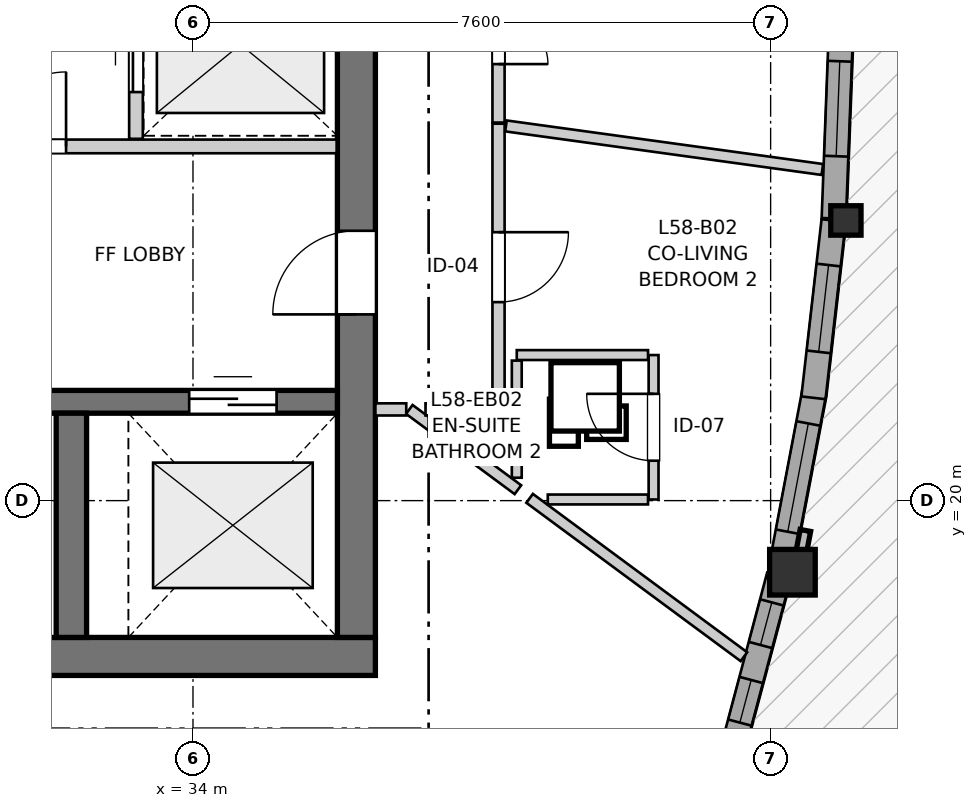
"""IFC4 building model, lengths in metres.
Left out: names, types, materials, properties, quantities, classifications, styles, units other than length and angle.
Written with IfcOpenShell. Run it as: python <this file> out.ifc"""

import sys

from ifc_helpers import new_model, si_unit, direction, frame, frame_2d, origin, origin_2d, place, context, subcontext, project, spatial, rectangle, i_section, extrude, source, transform, mapped, element, fill, save


model = new_model("IFC4")
c1 = context("Model", 3, precision=1e-05, world=origin(), true_north=direction((0.0, 1.0)))
c2 = subcontext(c1, "Body", "Model", "MODEL_VIEW")
j1 = project(units=[si_unit("LENGTHUNIT", "METRE"), si_unit("PLANEANGLEUNIT", "RADIAN")], contexts=[c1])
p1 = place(None, origin())
s1 = spatial("IfcSite", under=j1, at=p1, CompositionType="ELEMENT")
p2 = place(p1, origin())
s2 = spatial("IfcBuilding", under=s1, at=p2, CompositionType="ELEMENT")
p3 = place(p2, frame((0.0, 0.0, 195.6)))
s3 = spatial("IfcBuildingStorey", under=s2, at=p3, CompositionType="ELEMENT", Elevation=195.6)
p4 = place(p3, frame((24.3, 17.95, 0.0), z_axis=(0.0, 0.0, 1.0), x_axis=(1.0, 0.0, 0.0)))
e1 = element("IfcWall", 1, at=p4, inside=s3, PredefinedType="SHEAR", context=c2, shape_type="SweptSolid", body=[
    extrude(rectangle(XDim=12.1, YDim=0.5, at=frame_2d((6.05, 0.0))), origin(), (0.0, 0.0, 1.0), 2.96),
])
p5 = place(p3, frame((36.15, 18.2, 0.0), z_axis=(0.0, 0.0, 1.0), x_axis=(0.0, 1.0, 0.0)))
e2 = element("IfcWall", 2, at=p5, inside=s3, PredefinedType="SHEAR", context=c2, shape_type="SweptSolid", body=[
    extrude(rectangle(XDim=15.6, YDim=0.5, at=frame_2d((7.8, 0.0))), origin(), (0.0, 0.0, 1.0), 2.96),
])
p6 = place(p5, frame((4.25, 0.0, 0.0)))
e3 = element("IfcOpeningElement", 3, at=p6, cuts=e2, PredefinedType="OPENING", context=c2, shape_type="SweptSolid", body=[
    extrude(rectangle(XDim=1.1, YDim=2.15, at=frame_2d((0.55, 1.075))), frame((0.0, 0.26, 0.0), z_axis=(0.0, -1.0, 0.0), x_axis=(1.0, 0.0, 0.0)), (0.0, 0.0, 1.0), 0.52),
])
p7 = place(p5, frame((10.25, 0.0, 0.0)))
e4 = element("IfcOpeningElement", 4, at=p7, cuts=e2, PredefinedType="OPENING", context=c2, shape_type="SweptSolid", body=[
    extrude(rectangle(XDim=1.1, YDim=2.15, at=frame_2d((0.55, 1.075))), frame((0.0, 0.26, 0.0), z_axis=(0.0, -1.0, 0.0), x_axis=(1.0, 0.0, 0.0)), (0.0, 0.0, 1.0), 0.52),
])
p8 = place(p3, frame((24.8, 21.3, 0.0), z_axis=(0.0, 0.0, 1.0), x_axis=(1.0, 0.0, 0.0)))
e5 = element("IfcWall", 5, at=p8, inside=s3, PredefinedType="SHEAR", context=c2, shape_type="SweptSolid", body=[
    extrude(rectangle(XDim=11.1, YDim=0.3, at=frame_2d((5.55, 0.0))), origin(), (0.0, 0.0, 1.0), 2.96),
])
p9 = place(p8, frame((6.22, 0.0, 0.0)))
e6 = element("IfcOpeningElement", 6, at=p9, cuts=e5, PredefinedType="OPENING", context=c2, shape_type="SweptSolid", body=[
    extrude(rectangle(XDim=0.98, YDim=2.15, at=frame_2d((0.49, 1.075))), frame((0.0, 0.16, 0.0), z_axis=(0.0, -1.0, 0.0), x_axis=(1.0, 0.0, 0.0)), (0.0, 0.0, 1.0), 0.32),
])
p10 = place(p8, frame((9.15, 0.0, 0.0)))
e7 = element("IfcOpeningElement", 7, at=p10, cuts=e5, PredefinedType="OPENING", context=c2, shape_type="SweptSolid", body=[
    extrude(rectangle(XDim=1.15, YDim=2.15, at=frame_2d((0.575, 1.075))), frame((0.0, 0.16, 0.0), z_axis=(0.0, -1.0, 0.0), x_axis=(1.0, 0.0, 0.0)), (0.0, 0.0, 1.0), 0.32),
])
p11 = place(p3, frame((32.4, 18.2, 0.0), z_axis=(0.0, 0.0, 1.0), x_axis=(0.0, 1.0, 0.0)))
e8 = element("IfcWall", 8, at=p11, inside=s3, PredefinedType="SHEAR", context=c2, shape_type="SweptSolid", body=[
    extrude(rectangle(XDim=2.95, YDim=0.4, at=frame_2d((1.475, 0.0))), origin(), (0.0, 0.0, 1.0), 2.96),
])
m1 = source(origin(), c2, "Body", "SweptSolid", [
    extrude(rectangle(XDim=0.6, YDim=0.6, at=origin_2d()), origin(), (0.0, 0.0, 1.0), 2.96),
])
p12 = place(p3, frame((41.887, 19.058, 0.0), z_axis=(0.0, 0.0, 1.0), x_axis=(1.0, 0.0, 0.0)))
e9 = element("IfcColumn", 9, at=p12, inside=s3, PredefinedType="COLUMN", context=c2, shape_type="MappedRepresentation", body=[
    mapped(m1, transform((0.0, 0.0, 0.0), x_axis=(1.0, 0.0, 0.0), y_axis=(0.0, 1.0, 0.0), z_axis=(0.0, 0.0, 1.0), scale=1.0)),
])
m2 = source(origin(), c2, "Body", "SweptSolid", [
    extrude(i_section(OverallWidth=0.398, OverallDepth=0.387, WebThickness=0.019, FlangeThickness=0.03, FilletRadius=0.015, at=origin_2d()), origin(), (0.0, 0.0, 1.0), 2.96),
])
p13 = place(p3, frame((42.59, 23.686, 0.0), z_axis=(0.0, 0.0, 1.0), x_axis=(1.0, 0.0, 0.0)))
e10 = element("IfcColumn", 10, at=p13, inside=s3, PredefinedType="PILASTER", context=c2, shape_type="MappedRepresentation", body=[
    mapped(m2, transform((0.0, 0.0, 0.0), x_axis=(1.0, 0.0, 0.0), y_axis=(0.0, 1.0, 0.0), z_axis=(0.0, 0.0, 1.0), scale=1.0)),
])
p14 = place(p3, frame((41.107, 16.748, 0.0), z_axis=(0.0, 0.0, 1.0), x_axis=(0.257000958827, 0.966411148095, 0.0)))
e11 = element("IfcWall", 11, at=p14, inside=s3, PredefinedType="SOLIDWALL", context=c2, shape_type="SweptSolid", body=[
    extrude(rectangle(XDim=2.343, YDim=0.32, at=frame_2d((1.171, 0.0))), origin(), (0.0, 0.0, 1.0), 2.58),
])
p15 = place(p14, frame((0.343, 0.0, 0.82)))
e12 = element("IfcOpeningElement", 12, at=p15, cuts=e11, PredefinedType="OPENING", context=c2, shape_type="SweptSolid", body=[
    extrude(rectangle(XDim=0.58, YDim=1.35, at=frame_2d((0.29, 0.675))), frame((0.0, 0.17, 0.0), z_axis=(0.0, -1.0, 0.0), x_axis=(1.0, 0.0, 0.0)), (0.0, 0.0, 1.0), 0.34),
])
p16 = place(p14, frame((1.399, 0.0, 0.82)))
e13 = element("IfcOpeningElement", 13, at=p16, cuts=e11, PredefinedType="OPENING", context=c2, shape_type="SweptSolid", body=[
    extrude(rectangle(XDim=0.58, YDim=1.35, at=frame_2d((0.29, 0.675))), frame((0.0, 0.17, 0.0), z_axis=(0.0, -1.0, 0.0), x_axis=(1.0, 0.0, 0.0)), (0.0, 0.0, 1.0), 0.34),
])
p17 = place(p3, frame((41.747, 19.176, 0.0), z_axis=(0.0, 0.0, 1.0), x_axis=(0.186649393072, 0.982426589657, 0.0)))
e14 = element("IfcWall", 14, at=p17, inside=s3, PredefinedType="SOLIDWALL", context=c2, shape_type="SweptSolid", body=[
    extrude(rectangle(XDim=2.303, YDim=0.32, at=frame_2d((1.152, 0.0))), origin(), (0.0, 0.0, 1.0), 2.58),
])
p18 = place(p17, frame((0.422, 0.0, 0.82)))
e15 = element("IfcOpeningElement", 15, at=p18, cuts=e14, PredefinedType="OPENING", context=c2, shape_type="SweptSolid", body=[
    extrude(rectangle(XDim=1.45, YDim=1.25, at=frame_2d((0.725, 0.625))), frame((0.0, 0.17, 0.0), z_axis=(0.0, -1.0, 0.0), x_axis=(1.0, 0.0, 0.0)), (0.0, 0.0, 1.0), 0.34),
])
p19 = place(p3, frame((42.163, 21.352, 0.0), z_axis=(0.0, 0.0, 1.0), x_axis=(0.113273764078, 0.993563814947, 0.0)))
e16 = element("IfcWall", 16, at=p19, inside=s3, PredefinedType="SOLIDWALL", context=c2, shape_type="SweptSolid", body=[
    extrude(rectangle(XDim=2.347, YDim=0.32, at=frame_2d((1.174, 0.0))), origin(), (0.0, 0.0, 1.0), 2.58),
])
p20 = place(p19, frame((0.608, 0.0, 0.82)))
e17 = element("IfcOpeningElement", 17, at=p20, cuts=e16, PredefinedType="OPENING", context=c2, shape_type="SweptSolid", body=[
    extrude(rectangle(XDim=1.15, YDim=1.2, at=frame_2d((0.575, 0.6))), frame((0.0, 0.17, 0.0), z_axis=(0.0, -1.0, 0.0), x_axis=(1.0, 0.0, 0.0)), (0.0, 0.0, 1.0), 0.34),
])
p21 = place(p3, frame((42.431, 23.712, 0.0), z_axis=(0.0, 0.0, 1.0), x_axis=(0.037979071107, 0.999278534823, 0.0)))
e18 = element("IfcWall", 18, at=p21, inside=s3, PredefinedType="SOLIDWALL", context=c2, shape_type="SweptSolid", body=[
    extrude(rectangle(XDim=2.333, YDim=0.32, at=frame_2d((1.167, 0.0))), origin(), (0.0, 0.0, 1.0), 2.58),
])
p22 = place(p21, frame((0.82, 0.0, 0.82)))
e19 = element("IfcOpeningElement", 19, at=p22, cuts=e18, PredefinedType="OPENING", context=c2, shape_type="SweptSolid", body=[
    extrude(rectangle(XDim=1.25, YDim=1.35, at=frame_2d((0.625, 0.675))), frame((0.0, 0.17, 0.0), z_axis=(0.0, -1.0, 0.0), x_axis=(1.0, 0.0, 0.0)), (0.0, 0.0, 1.0), 0.34),
])
p23 = place(p3, frame((30.67, 24.66, 0.0), z_axis=(0.0, 0.0, 1.0), x_axis=(1.0, 0.0, 0.0)))
e20 = element("IfcWall", 20, at=p23, inside=s3, PredefinedType="PARTITIONING", context=c2, shape_type="SweptSolid", body=[
    extrude(rectangle(XDim=5.22, YDim=0.18, at=frame_2d((2.61, 0.0))), origin(), (0.0, 0.0, 1.0), 2.96),
])
p24 = place(p23, frame((0.68, 0.0, 0.0)))
e21 = element("IfcOpeningElement", 21, at=p24, cuts=e20, PredefinedType="OPENING", context=c2, shape_type="SweptSolid", body=[
    extrude(rectangle(XDim=0.98, YDim=2.15, at=frame_2d((0.49, 1.075))), frame((0.0, 0.1, 0.0), z_axis=(0.0, -1.0, 0.0), x_axis=(1.0, 0.0, 0.0)), (0.0, 0.0, 1.0), 0.2),
])
p25 = place(p3, frame((33.25, 24.76, 0.0), z_axis=(0.0, 0.0, 1.0), x_axis=(0.0, 1.0, 0.0)))
e22 = element("IfcWall", 22, at=p25, inside=s3, PredefinedType="PARTITIONING", context=c2, shape_type="SweptSolid", body=[
    extrude(rectangle(XDim=2.48, YDim=0.18, at=frame_2d((1.24, 0.0))), origin(), (0.0, 0.0, 1.0), 2.96),
])
p26 = place(p25, frame((0.615, 0.0, 0.0)))
e23 = element("IfcOpeningElement", 23, at=p26, cuts=e22, PredefinedType="OPENING", context=c2, shape_type="SweptSolid", body=[
    extrude(rectangle(XDim=1.25, YDim=2.15, at=frame_2d((0.625, 1.075))), frame((0.0, 0.1, 0.0), z_axis=(0.0, -1.0, 0.0), x_axis=(1.0, 0.0, 0.0)), (0.0, 0.0, 1.0), 0.2),
])
p27 = place(p3, frame((38.02, 24.959, 0.0), z_axis=(0.0, 0.0, 1.0), x_axis=(0.0, -1.0, 0.0)))
e24 = element("IfcWall", 24, at=p27, inside=s3, PredefinedType="PARTITIONING", context=c2, shape_type="SweptSolid", body=[
    extrude(rectangle(XDim=3.759, YDim=0.16, at=frame_2d((1.879, 0.0))), origin(), (0.0, 0.0, 1.0), 2.96),
])
p28 = place(p27, frame((1.427, 0.0, 0.0)))
e25 = element("IfcOpeningElement", 25, at=p28, cuts=e24, PredefinedType="OPENING", context=c2, shape_type="SweptSolid", body=[
    extrude(rectangle(XDim=0.92, YDim=2.1, at=frame_2d((0.46, 1.05))), frame((0.0, 0.09, 0.0), z_axis=(0.0, -1.0, 0.0), x_axis=(1.0, 0.0, 0.0)), (0.0, 0.0, 1.0), 0.18),
])
p29 = place(p3, frame((38.02, 27.813, 0.0), z_axis=(0.0, 0.0, 1.0), x_axis=(0.0, -1.0, 0.0)))
e26 = element("IfcWall", 26, at=p29, inside=s3, PredefinedType="PARTITIONING", context=c2, shape_type="SweptSolid", body=[
    extrude(rectangle(XDim=2.839, YDim=0.16, at=frame_2d((1.419, 0.0))), origin(), (0.0, 0.0, 1.0), 2.96),
])
p30 = place(p29, frame((0.77, 0.0, 0.0)))
e27 = element("IfcOpeningElement", 27, at=p30, cuts=e26, PredefinedType="OPENING", context=c2, shape_type="SweptSolid", body=[
    extrude(rectangle(XDim=1.3, YDim=2.1, at=frame_2d((0.65, 1.05))), frame((0.0, 0.09, 0.0), z_axis=(0.0, -1.0, 0.0), x_axis=(1.0, 0.0, 0.0)), (0.0, 0.0, 1.0), 0.18),
])
p31 = place(p3, frame((40.06, 20.015, 0.0), z_axis=(0.0, 0.0, 1.0), x_axis=(0.0, 1.0, 0.0)))
e28 = element("IfcWall", 28, at=p31, inside=s3, PredefinedType="PARTITIONING", context=c2, shape_type="SweptSolid", body=[
    extrude(rectangle(XDim=1.9, YDim=0.13, at=frame_2d((0.95, 0.0))), origin(), (0.0, 0.0, 1.0), 2.598),
])
p32 = place(p31, frame((0.51, 0.0, 0.0)))
e29 = element("IfcOpeningElement", 29, at=p32, cuts=e28, PredefinedType="OPENING", context=c2, shape_type="SweptSolid", body=[
    extrude(rectangle(XDim=0.88, YDim=2.05, at=frame_2d((0.44, 1.025))), frame((0.0, 0.075, 0.0), z_axis=(0.0, -1.0, 0.0), x_axis=(1.0, 0.0, 0.0)), (0.0, 0.0, 1.0), 0.15),
])
p33 = place(p3, frame((38.118, 24.929, 0.0), z_axis=(0.0, 0.0, 1.0), x_axis=(0.990658246077, -0.136368029533, 0.0)))
e30 = element("IfcWall", 30, at=p33, inside=s3, PredefinedType="PARTITIONING", context=c2, shape_type="SweptSolid", body=[
    extrude(rectangle(XDim=4.202, YDim=0.145, at=frame_2d((2.101, 0.0))), origin(), (0.0, 0.0, 1.0), 2.96),
])
p34 = place(p3, frame((38.429, 20.03, 0.0), z_axis=(0.0, 0.0, 1.0), x_axis=(0.804249944798, -0.594291196546, 0.0)))
e31 = element("IfcWall", 31, at=p34, inside=s3, PredefinedType="PARTITIONING", context=c2, shape_type="SweptSolid", body=[
    extrude(rectangle(XDim=3.506, YDim=0.145, at=frame_2d((1.753, 0.0))), origin(), (0.0, 0.0, 1.0), 2.96),
])
p35 = place(p3, frame((38.26, 21.915, 0.0), z_axis=(0.0, 0.0, 1.0), x_axis=(1.0, 0.0, 0.0)))
e32 = element("IfcWall", 32, at=p35, inside=s3, PredefinedType="PARTITIONING", context=c2, shape_type="SweptSolid", body=[
    extrude(rectangle(XDim=1.727, YDim=0.13, at=frame_2d((0.864, 0.0))), origin(), (0.0, 0.0, 1.0), 2.96),
])
p36 = place(p3, frame((36.846, 21.2, 0.0), z_axis=(0.0, 0.0, 1.0), x_axis=(0.804250382672, -0.594290603974, 0.0)))
e33 = element("IfcWall", 33, at=p36, inside=s3, PredefinedType="PARTITIONING", context=c2, shape_type="SweptSolid", body=[
    extrude(rectangle(XDim=1.777, YDim=0.145, at=frame_2d((0.888, 0.0))), origin(), (0.0, 0.0, 1.0), 2.96),
])
p37 = place(p3, frame((38.26, 20.301, 0.0), z_axis=(0.0, 0.0, 1.0), x_axis=(0.0, 1.0, 0.0)))
e34 = element("IfcWall", 34, at=p37, inside=s3, PredefinedType="PARTITIONING", context=c2, shape_type="SweptSolid", body=[
    extrude(rectangle(XDim=1.541, YDim=0.13, at=frame_2d((0.771, 0.0))), origin(), (0.0, 0.0, 1.0), 2.628),
])
p38 = place(p3, frame((38.668, 20.015, 0.0), z_axis=(0.0, 0.0, 1.0), x_axis=(1.0, 0.0, 0.0)))
e35 = element("IfcWall", 35, at=p38, inside=s3, PredefinedType="PARTITIONING", context=c2, shape_type="SweptSolid", body=[
    extrude(rectangle(XDim=1.319, YDim=0.13, at=frame_2d((0.66, 0.0))), origin(), (0.0, 0.0, 1.0), 2.96),
])
p39 = place(p3, frame((37.059, 21.2, 0.0), z_axis=(0.0, 0.0, 1.0), x_axis=(1.0, 0.0, 0.0)))
e36 = element("IfcWall", 36, at=p39, inside=s3, PredefinedType="PARTITIONING", context=c2, shape_type="SweptSolid", body=[
    extrude(rectangle(XDim=0.873, YDim=0.16, at=frame_2d((0.437, 0.0))), origin(), (0.0, 0.0, 1.0), 2.96),
])
p40 = place(p3, frame((36.4, 21.2, 0.0), z_axis=(0.0, 0.0, 1.0), x_axis=(1.0, 0.0, 0.0)))
e37 = element("IfcWall", 37, at=p40, inside=s3, PredefinedType="PARTITIONING", context=c2, shape_type="SweptSolid", body=[
    extrude(rectangle(XDim=0.406, YDim=0.16, at=frame_2d((0.203, 0.0))), origin(), (0.0, 0.0, 1.0), 2.96),
])
m3 = source(origin(), c2, "Body", "SweptSolid", [
    extrude(rectangle(XDim=0.58, YDim=1.35, at=frame_2d((0.29, 0.675))), frame((0.0, 0.03, 0.0), z_axis=(0.0, -1.0, 0.0), x_axis=(1.0, 0.0, 0.0)), (0.0, 0.0, 1.0), 0.06),
])
p41 = place(p15, origin())
e38 = element("IfcWindow", 38, at=p41, inside=s3, PartitioningType="SINGLE_PANEL", PredefinedType="WINDOW", context=c2, shape_type="MappedRepresentation", body=[
    mapped(m3, transform((0.0, 0.0, 0.0), x_axis=(1.0, 0.0, 0.0), y_axis=(0.0, 1.0, 0.0), z_axis=(0.0, 0.0, 1.0), scale=1.0)),
])
fill(e12, e38)
p42 = place(p16, origin())
e39 = element("IfcWindow", 39, at=p42, inside=s3, PartitioningType="SINGLE_PANEL", PredefinedType="WINDOW", context=c2, shape_type="MappedRepresentation", body=[
    mapped(m3, transform((0.0, 0.0, 0.0), x_axis=(1.0, 0.0, 0.0), y_axis=(0.0, 1.0, 0.0), z_axis=(0.0, 0.0, 1.0), scale=1.0)),
])
fill(e13, e39)
m4 = source(origin(), c2, "Body", "SweptSolid", [
    extrude(rectangle(XDim=1.45, YDim=1.25, at=frame_2d((0.725, 0.625))), frame((0.0, 0.03, 0.0), z_axis=(0.0, -1.0, 0.0), x_axis=(1.0, 0.0, 0.0)), (0.0, 0.0, 1.0), 0.06),
])
p43 = place(p18, origin())
e40 = element("IfcWindow", 40, at=p43, inside=s3, PartitioningType="SINGLE_PANEL", PredefinedType="WINDOW", context=c2, shape_type="MappedRepresentation", body=[
    mapped(m4, transform((0.0, 0.0, 0.0), x_axis=(1.0, 0.0, 0.0), y_axis=(0.0, 1.0, 0.0), z_axis=(0.0, 0.0, 1.0), scale=1.0)),
])
fill(e15, e40)
m5 = source(origin(), c2, "Body", "SweptSolid", [
    extrude(rectangle(XDim=1.15, YDim=1.2, at=frame_2d((0.575, 0.6))), frame((0.0, 0.03, 0.0), z_axis=(0.0, -1.0, 0.0), x_axis=(1.0, 0.0, 0.0)), (0.0, 0.0, 1.0), 0.06),
])
p44 = place(p20, origin())
e41 = element("IfcWindow", 41, at=p44, inside=s3, PartitioningType="SINGLE_PANEL", PredefinedType="WINDOW", context=c2, shape_type="MappedRepresentation", body=[
    mapped(m5, transform((0.0, 0.0, 0.0), x_axis=(1.0, 0.0, 0.0), y_axis=(0.0, 1.0, 0.0), z_axis=(0.0, 0.0, 1.0), scale=1.0)),
])
fill(e17, e41)
m6 = source(origin(), c2, "Body", "SweptSolid", [
    extrude(rectangle(XDim=1.25, YDim=1.35, at=frame_2d((0.625, 0.675))), frame((0.0, 0.03, 0.0), z_axis=(0.0, -1.0, 0.0), x_axis=(1.0, 0.0, 0.0)), (0.0, 0.0, 1.0), 0.06),
])
p45 = place(p22, origin())
e42 = element("IfcWindow", 42, at=p45, inside=s3, PartitioningType="SINGLE_PANEL", PredefinedType="WINDOW", context=c2, shape_type="MappedRepresentation", body=[
    mapped(m6, transform((0.0, 0.0, 0.0), x_axis=(1.0, 0.0, 0.0), y_axis=(0.0, 1.0, 0.0), z_axis=(0.0, 0.0, 1.0), scale=1.0)),
])
fill(e19, e42)
m7 = source(origin(), c2, "Body", "SweptSolid", [
    extrude(rectangle(XDim=1.15, YDim=2.15, at=frame_2d((0.575, 1.075))), frame((0.0, 0.025, 0.0), z_axis=(0.0, -1.0, 0.0), x_axis=(1.0, 0.0, 0.0)), (0.0, 0.0, 1.0), 0.05),
])
p46 = place(p10, origin())
e43 = element("IfcDoor", 43, at=p46, inside=s3, OperationType="DOUBLE_DOOR_SLIDING", PredefinedType="DOOR", context=c2, shape_type="MappedRepresentation", body=[
    mapped(m7, transform((0.0, 0.0, 0.0), x_axis=(1.0, 0.0, 0.0), y_axis=(0.0, 1.0, 0.0), z_axis=(0.0, 0.0, 1.0), scale=1.0)),
])
fill(e7, e43)
m8 = source(origin(), c2, "Body", "SweptSolid", [
    extrude(rectangle(XDim=1.1, YDim=2.15, at=frame_2d((0.55, 1.075))), frame((0.0, 0.025, 0.0), z_axis=(0.0, -1.0, 0.0), x_axis=(1.0, 0.0, 0.0)), (0.0, 0.0, 1.0), 0.05),
])
p47 = place(p6, origin())
e44 = element("IfcDoor", 44, at=p47, inside=s3, OperationType="SINGLE_SWING_LEFT", PredefinedType="DOOR", context=c2, shape_type="MappedRepresentation", body=[
    mapped(m8, transform((0.0, 0.0, 0.0), x_axis=(1.0, 0.0, 0.0), y_axis=(0.0, 1.0, 0.0), z_axis=(0.0, 0.0, 1.0), scale=1.0)),
])
fill(e3, e44)
m9 = source(origin(), c2, "Body", "SweptSolid", [
    extrude(rectangle(XDim=0.98, YDim=2.15, at=frame_2d((0.49, 1.075))), frame((0.0, 0.025, 0.0), z_axis=(0.0, -1.0, 0.0), x_axis=(1.0, 0.0, 0.0)), (0.0, 0.0, 1.0), 0.05),
])
p48 = place(p24, origin())
e45 = element("IfcDoor", 45, at=p48, inside=s3, OperationType="SINGLE_SWING_RIGHT", PredefinedType="DOOR", context=c2, shape_type="MappedRepresentation", body=[
    mapped(m9, transform((0.0, 0.0, 0.0), x_axis=(1.0, 0.0, 0.0), y_axis=(0.0, 1.0, 0.0), z_axis=(0.0, 0.0, 1.0), scale=1.0)),
])
fill(e21, e45)
m10 = source(origin(), c2, "Body", "SweptSolid", [
    extrude(rectangle(XDim=1.25, YDim=2.15, at=frame_2d((0.625, 1.075))), frame((0.0, 0.025, 0.0), z_axis=(0.0, -1.0, 0.0), x_axis=(1.0, 0.0, 0.0)), (0.0, 0.0, 1.0), 0.05),
])
p49 = place(p26, origin())
e46 = element("IfcDoor", 46, at=p49, inside=s3, OperationType="DOUBLE_DOOR_SLIDING", PredefinedType="DOOR", context=c2, shape_type="MappedRepresentation", body=[
    mapped(m10, transform((0.0, 0.0, 0.0), x_axis=(1.0, 0.0, 0.0), y_axis=(0.0, 1.0, 0.0), z_axis=(0.0, 0.0, 1.0), scale=1.0)),
])
fill(e23, e46)
m11 = source(origin(), c2, "Body", "SweptSolid", [
    extrude(rectangle(XDim=0.92, YDim=2.1, at=frame_2d((0.46, 1.05))), frame((0.0, 0.025, 0.0), z_axis=(0.0, -1.0, 0.0), x_axis=(1.0, 0.0, 0.0)), (0.0, 0.0, 1.0), 0.05),
])
p50 = place(p28, origin())
e47 = element("IfcDoor", 47, at=p50, inside=s3, OperationType="SINGLE_SWING_LEFT", PredefinedType="DOOR", context=c2, shape_type="MappedRepresentation", body=[
    mapped(m11, transform((0.0, 0.0, 0.0), x_axis=(1.0, 0.0, 0.0), y_axis=(0.0, 1.0, 0.0), z_axis=(0.0, 0.0, 1.0), scale=1.0)),
])
fill(e25, e47)
m12 = source(origin(), c2, "Body", "SweptSolid", [
    extrude(rectangle(XDim=1.3, YDim=2.1, at=frame_2d((0.65, 1.05))), frame((0.0, 0.025, 0.0), z_axis=(0.0, -1.0, 0.0), x_axis=(1.0, 0.0, 0.0)), (0.0, 0.0, 1.0), 0.05),
])
p51 = place(p30, origin())
e48 = element("IfcDoor", 48, at=p51, inside=s3, OperationType="DOUBLE_DOOR_SINGLE_SWING", PredefinedType="DOOR", context=c2, shape_type="MappedRepresentation", body=[
    mapped(m12, transform((0.0, 0.0, 0.0), x_axis=(1.0, 0.0, 0.0), y_axis=(0.0, 1.0, 0.0), z_axis=(0.0, 0.0, 1.0), scale=1.0)),
])
fill(e27, e48)
m13 = source(origin(), c2, "Body", "SweptSolid", [
    extrude(rectangle(XDim=0.88, YDim=2.05, at=frame_2d((0.44, 1.025))), frame((0.0, 0.025, 0.0), z_axis=(0.0, -1.0, 0.0), x_axis=(1.0, 0.0, 0.0)), (0.0, 0.0, 1.0), 0.05),
])
p52 = place(p32, origin())
e49 = element("IfcDoor", 49, at=p52, inside=s3, OperationType="SINGLE_SWING_RIGHT", PredefinedType="DOOR", context=c2, shape_type="MappedRepresentation", body=[
    mapped(m13, transform((0.0, 0.0, 0.0), x_axis=(1.0, 0.0, 0.0), y_axis=(0.0, 1.0, 0.0), z_axis=(0.0, 0.0, 1.0), scale=1.0)),
])
fill(e29, e49)
save(model, sys.argv[1])
